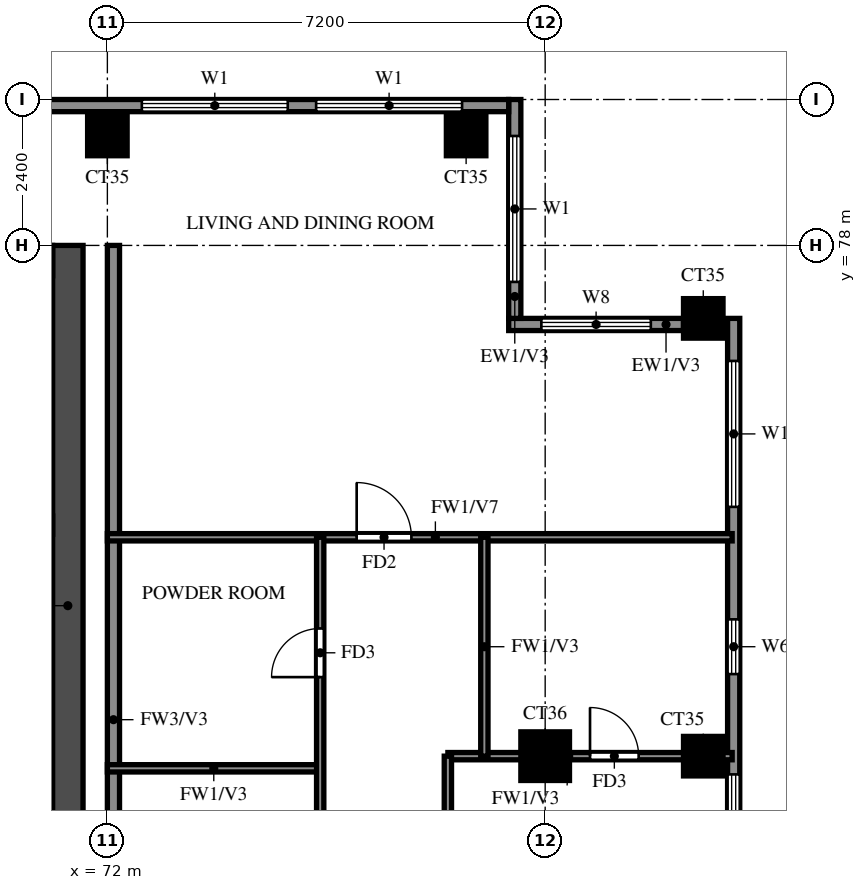
"""IFC4 building model, lengths in metres.
Left out: names, types, materials, properties, quantities, classifications, styles, units other than length and angle.
Written with IfcOpenShell. Run it as: python <this file> out.ifc"""

import sys

from ifc_helpers import new_model, si_unit, direction, frame, frame_2d, origin, origin_2d, place, context, subcontext, project, spatial, rectangle, extrude, source, transform, mapped, element, fill, save


model = new_model("IFC4")
c1 = context("Model", 3, precision=1e-05, world=origin(), true_north=direction((0.0, 1.0)))
c2 = subcontext(c1, "Body", "Model", "MODEL_VIEW")
j1 = project(units=[si_unit("LENGTHUNIT", "METRE"), si_unit("PLANEANGLEUNIT", "RADIAN")], contexts=[c1])
p1 = place(None, origin())
s1 = spatial("IfcSite", under=j1, at=p1, CompositionType="ELEMENT")
p2 = place(p1, origin())
s2 = spatial("IfcBuilding", under=s1, at=p2, CompositionType="ELEMENT")
p3 = place(p2, frame((0.0, 0.0, 246.5)))
s3 = spatial("IfcBuildingStorey", under=s2, at=p3, CompositionType="ELEMENT", Elevation=246.5)
m1 = source(origin(), c2, "Body", "SweptSolid", [
    extrude(rectangle(XDim=0.8, YDim=0.8, at=origin_2d()), origin(), (0.0, 0.0, 1.0), 3.22),
])
p4 = place(p3, frame((79.2, 69.6, 0.0), z_axis=(0.0, 0.0, 1.0), x_axis=(1.0, 0.0, 0.0)))
e1 = element("IfcColumn", 1, at=p4, inside=s3, PredefinedType="COLUMN", context=c2, shape_type="MappedRepresentation", body=[
    mapped(m1, transform((0.0, 0.0, 0.0))),
])
m2 = source(origin(), c2, "Body", "SweptSolid", [
    extrude(rectangle(XDim=0.65, YDim=0.65, at=origin_2d()), origin(), (0.0, 0.0, 1.0), 3.22),
])
for number, where, z_axis, x_axis in (
    (2, (81.8, 69.6, 0.0), (0.0, 0.0, 1.0), (1.0, 0.0, 0.0)),
    (3, (81.8, 76.8, 0.0), (0.0, 0.0, 1.0), (1.0, 0.0, 0.0)),
    (4, (72.0, 79.8, 0.0), (0.0, 0.0, 1.0), (1.0, 0.0, 0.0)),
    (5, (77.9, 79.8, 0.0), (0.0, 0.0, 1.0), (1.0, 0.0, 0.0)),
):
    element("IfcColumn", number, at=place(p3, frame(where, z_axis=z_axis, x_axis=x_axis)), inside=s3, PredefinedType="COLUMN", context=c2, shape_type="MappedRepresentation", body=[
        mapped(m2, transform((0.0, 0.0, 0.0))),
    ])
p5 = place(p3, frame((71.35, 66.15, 0.0), z_axis=(0.0, 0.0, 1.0), x_axis=(0.0, 1.0, 0.0)))
e6 = element("IfcWall", 6, at=p5, inside=s3, PredefinedType="SHEAR", context=c2, shape_type="SweptSolid", body=[
    extrude(rectangle(XDim=11.85, YDim=0.5, at=frame_2d((5.925, 0.0))), origin(), (0.0, 0.0, 1.0), 3.22),
])
p6 = place(p3, frame((29.7, 77.75, 0.0), z_axis=(0.0, 0.0, 1.0), x_axis=(1.0, 0.0, 0.0)))
e7 = element("IfcWall", 7, at=p6, inside=s3, PredefinedType="SHEAR", context=c2, shape_type="SweptSolid", body=[
    extrude(rectangle(XDim=41.4, YDim=0.5, at=frame_2d((20.7, 0.0))), origin(), (0.0, 0.0, 1.0), 3.22),
])
p7 = place(p3, frame((82.3, 48.2, 0.0), z_axis=(0.0, 0.0, 1.0), x_axis=(0.0, 1.0, 0.0)))
e8 = element("IfcWall", 8, at=p7, inside=s3, PredefinedType="SOLIDWALL", context=c2, shape_type="SweptSolid", body=[
    extrude(rectangle(XDim=28.6, YDim=0.2, at=frame_2d((14.3, 0.0))), origin(), (0.0, 0.0, 1.0), 3.22),
])
p8 = place(p7, frame((15.1, 0.0, 0.0)))
e9 = element("IfcOpeningElement", 9, at=p8, cuts=e8, PredefinedType="OPENING", context=c2, shape_type="SweptSolid", body=[
    extrude(rectangle(XDim=1.8, YDim=2.4, at=frame_2d((0.9, 1.2))), frame((0.0, 0.11, 0.0), z_axis=(0.0, -1.0, 0.0), x_axis=(1.0, 0.0, 0.0)), (0.0, 0.0, 1.0), 0.22),
])
p9 = place(p7, frame((0.9, 0.0, 0.6)))
e10 = element("IfcOpeningElement", 10, at=p9, cuts=e8, PredefinedType="OPENING", context=c2, shape_type="SweptSolid", body=[
    extrude(rectangle(XDim=2.4, YDim=2.4, at=frame_2d((1.2, 1.2))), frame((0.0, 0.11, 0.0), z_axis=(0.0, -1.0, 0.0), x_axis=(1.0, 0.0, 0.0)), (0.0, 0.0, 1.0), 0.22),
])
p10 = place(p7, frame((3.9, 0.0, 0.6)))
e11 = element("IfcOpeningElement", 11, at=p10, cuts=e8, PredefinedType="OPENING", context=c2, shape_type="SweptSolid", body=[
    extrude(rectangle(XDim=2.4, YDim=2.4, at=frame_2d((1.2, 1.2))), frame((0.0, 0.11, 0.0), z_axis=(0.0, -1.0, 0.0), x_axis=(1.0, 0.0, 0.0)), (0.0, 0.0, 1.0), 0.22),
])
p11 = place(p7, frame((7.6, 0.0, 0.6)))
e12 = element("IfcOpeningElement", 12, at=p11, cuts=e8, PredefinedType="OPENING", context=c2, shape_type="SweptSolid", body=[
    extrude(rectangle(XDim=2.4, YDim=2.4, at=frame_2d((1.2, 1.2))), frame((0.0, 0.11, 0.0), z_axis=(0.0, -1.0, 0.0), x_axis=(1.0, 0.0, 0.0)), (0.0, 0.0, 1.0), 0.22),
])
p12 = place(p7, frame((10.75, 0.0, 0.6)))
e13 = element("IfcOpeningElement", 13, at=p12, cuts=e8, PredefinedType="OPENING", context=c2, shape_type="SweptSolid", body=[
    extrude(rectangle(XDim=0.9, YDim=2.4, at=frame_2d((0.45, 1.2))), frame((0.0, 0.11, 0.0), z_axis=(0.0, -1.0, 0.0), x_axis=(1.0, 0.0, 0.0)), (0.0, 0.0, 1.0), 0.22),
])
p13 = place(p7, frame((12.7, 0.0, 0.6)))
e14 = element("IfcOpeningElement", 14, at=p13, cuts=e8, PredefinedType="OPENING", context=c2, shape_type="SweptSolid", body=[
    extrude(rectangle(XDim=1.2, YDim=2.4, at=frame_2d((0.6, 1.2))), frame((0.0, 0.11, 0.0), z_axis=(0.0, -1.0, 0.0), x_axis=(1.0, 0.0, 0.0)), (0.0, 0.0, 1.0), 0.22),
])
p14 = place(p7, frame((17.35, 0.0, 0.6)))
e15 = element("IfcOpeningElement", 15, at=p14, cuts=e8, PredefinedType="OPENING", context=c2, shape_type="SweptSolid", body=[
    extrude(rectangle(XDim=0.9, YDim=2.4, at=frame_2d((0.45, 1.2))), frame((0.0, 0.11, 0.0), z_axis=(0.0, -1.0, 0.0), x_axis=(1.0, 0.0, 0.0)), (0.0, 0.0, 1.0), 0.22),
])
p15 = place(p7, frame((19.3, 0.0, 0.6)))
e16 = element("IfcOpeningElement", 16, at=p15, cuts=e8, PredefinedType="OPENING", context=c2, shape_type="SweptSolid", body=[
    extrude(rectangle(XDim=1.8, YDim=2.4, at=frame_2d((0.9, 1.2))), frame((0.0, 0.11, 0.0), z_axis=(0.0, -1.0, 0.0), x_axis=(1.0, 0.0, 0.0)), (0.0, 0.0, 1.0), 0.22),
])
p16 = place(p7, frame((22.75, 0.0, 1.5)))
e17 = element("IfcOpeningElement", 17, at=p16, cuts=e8, PredefinedType="OPENING", context=c2, shape_type="SweptSolid", body=[
    extrude(rectangle(XDim=0.9, YDim=0.9, at=frame_2d((0.45, 0.45))), frame((0.0, 0.11, 0.0), z_axis=(0.0, -1.0, 0.0), x_axis=(1.0, 0.0, 0.0)), (0.0, 0.0, 1.0), 0.22),
])
p17 = place(p7, frame((25.5, 0.0, 0.6)))
e18 = element("IfcOpeningElement", 18, at=p17, cuts=e8, PredefinedType="OPENING", context=c2, shape_type="SweptSolid", body=[
    extrude(rectangle(XDim=2.4, YDim=2.4, at=frame_2d((1.2, 1.2))), frame((0.0, 0.11, 0.0), z_axis=(0.0, -1.0, 0.0), x_axis=(1.0, 0.0, 0.0)), (0.0, 0.0, 1.0), 0.22),
])
p18 = place(p3, frame((81.475, 76.7, 0.0), z_axis=(0.0, 0.0, 1.0), x_axis=(-1.0, 0.0, 0.0)))
e19 = element("IfcWall", 19, at=p18, inside=s3, PredefinedType="SOLIDWALL", context=c2, shape_type="SweptSolid", body=[
    extrude(rectangle(XDim=2.875, YDim=0.2, at=frame_2d((1.438, 0.0))), origin(), (0.0, 0.0, 1.0), 3.22),
])
p19 = place(p18, frame((0.538, 0.0, 0.6)))
e20 = element("IfcOpeningElement", 20, at=p19, cuts=e19, PredefinedType="OPENING", context=c2, shape_type="SweptSolid", body=[
    extrude(rectangle(XDim=1.8, YDim=2.4, at=frame_2d((0.9, 1.2))), frame((0.0, 0.11, 0.0), z_axis=(0.0, -1.0, 0.0), x_axis=(1.0, 0.0, 0.0)), (0.0, 0.0, 1.0), 0.22),
])
p20 = place(p3, frame((78.7, 76.8, 0.0), z_axis=(0.0, 0.0, 1.0), x_axis=(0.0, 1.0, 0.0)))
e21 = element("IfcWall", 21, at=p20, inside=s3, PredefinedType="SOLIDWALL", context=c2, shape_type="SweptSolid", body=[
    extrude(rectangle(XDim=3.6, YDim=0.2, at=frame_2d((1.8, 0.0))), origin(), (0.0, 0.0, 1.0), 3.22),
])
p21 = place(p20, frame((0.6, 0.0, 0.6)))
e22 = element("IfcOpeningElement", 22, at=p21, cuts=e21, PredefinedType="OPENING", context=c2, shape_type="SweptSolid", body=[
    extrude(rectangle(XDim=2.4, YDim=2.4, at=frame_2d((1.2, 1.2))), frame((0.0, 0.11, 0.0), z_axis=(0.0, -1.0, 0.0), x_axis=(1.0, 0.0, 0.0)), (0.0, 0.0, 1.0), 0.22),
])
p22 = place(p3, frame((78.6, 80.3, 0.0), z_axis=(0.0, 0.0, 1.0), x_axis=(-1.0, 0.0, 0.0)))
e23 = element("IfcWall", 23, at=p22, inside=s3, PredefinedType="SOLIDWALL", context=c2, shape_type="SweptSolid", body=[
    extrude(rectangle(XDim=56.6, YDim=0.2, at=frame_2d((28.3, 0.0))), origin(), (0.0, 0.0, 1.0), 3.22),
])
p23 = place(p22, frame((50.433, 0.0, 0.6)))
e24 = element("IfcOpeningElement", 24, at=p23, cuts=e23, PredefinedType="OPENING", context=c2, shape_type="SweptSolid", body=[
    extrude(rectangle(XDim=2.4, YDim=2.4, at=frame_2d((1.2, 1.2))), frame((0.0, 0.11, 0.0), z_axis=(0.0, -1.0, 0.0), x_axis=(1.0, 0.0, 0.0)), (0.0, 0.0, 1.0), 0.22),
])
p24 = place(p22, frame((53.367, 0.0, 0.6)))
e25 = element("IfcOpeningElement", 25, at=p24, cuts=e23, PredefinedType="OPENING", context=c2, shape_type="SweptSolid", body=[
    extrude(rectangle(XDim=2.4, YDim=2.4, at=frame_2d((1.2, 1.2))), frame((0.0, 0.11, 0.0), z_axis=(0.0, -1.0, 0.0), x_axis=(1.0, 0.0, 0.0)), (0.0, 0.0, 1.0), 0.22),
])
p25 = place(p22, frame((0.767, 0.0, 0.6)))
e26 = element("IfcOpeningElement", 26, at=p25, cuts=e23, PredefinedType="OPENING", context=c2, shape_type="SweptSolid", body=[
    extrude(rectangle(XDim=2.4, YDim=2.4, at=frame_2d((1.2, 1.2))), frame((0.0, 0.11, 0.0), z_axis=(0.0, -1.0, 0.0), x_axis=(1.0, 0.0, 0.0)), (0.0, 0.0, 1.0), 0.22),
])
p26 = place(p22, frame((3.633, 0.0, 0.6)))
e27 = element("IfcOpeningElement", 27, at=p26, cuts=e23, PredefinedType="OPENING", context=c2, shape_type="SweptSolid", body=[
    extrude(rectangle(XDim=2.4, YDim=2.4, at=frame_2d((1.2, 1.2))), frame((0.0, 0.11, 0.0), z_axis=(0.0, -1.0, 0.0), x_axis=(1.0, 0.0, 0.0)), (0.0, 0.0, 1.0), 0.22),
])
p27 = place(p3, frame((72.1, 62.4, 0.0), z_axis=(0.0, 0.0, 1.0), x_axis=(0.0, 1.0, 0.0)))
e28 = element("IfcWall", 28, at=p27, inside=s3, PredefinedType="SOLIDWALL", context=c2, shape_type="SweptSolid", body=[
    extrude(rectangle(XDim=15.6, YDim=0.2, at=frame_2d((7.8, 0.0))), origin(), (0.0, 0.0, 1.0), 3.22),
])
p28 = place(p3, frame((72.0, 69.4, 0.0), z_axis=(0.0, 0.0, 1.0), x_axis=(1.0, 0.0, 0.0)))
e29 = element("IfcWall", 29, at=p28, inside=s3, PredefinedType="PARTITIONING", context=c2, shape_type="SweptSolid", body=[
    extrude(rectangle(XDim=3.5, YDim=0.12, at=frame_2d((1.75, 0.0))), origin(), (0.0, 0.0, 1.0), 3.22),
])
p29 = place(p3, frame((77.6, 69.6, 0.0), z_axis=(0.0, 0.0, 1.0), x_axis=(1.0, 0.0, 0.0)))
e30 = element("IfcWall", 30, at=p29, inside=s3, PredefinedType="PARTITIONING", context=c2, shape_type="SweptSolid", body=[
    extrude(rectangle(XDim=4.675, YDim=0.12, at=frame_2d((2.337, 0.0))), origin(), (0.0, 0.0, 1.0), 3.22),
])
p30 = place(p29, frame((2.337, 0.0, 0.0)))
e31 = element("IfcOpeningElement", 31, at=p30, cuts=e30, PredefinedType="OPENING", context=c2, shape_type="SweptSolid", body=[
    extrude(rectangle(XDim=0.8, YDim=2.1, at=frame_2d((0.4, 1.05))), frame((0.0, 0.07, 0.0), z_axis=(0.0, -1.0, 0.0), x_axis=(1.0, 0.0, 0.0)), (0.0, 0.0, 1.0), 0.14),
])
p31 = place(p3, frame((72.0, 73.2, 0.0), z_axis=(0.0, 0.0, 1.0), x_axis=(1.0, 0.0, 0.0)))
e32 = element("IfcWall", 32, at=p31, inside=s3, PredefinedType="PARTITIONING", context=c2, shape_type="SweptSolid", body=[
    extrude(rectangle(XDim=10.275, YDim=0.12, at=frame_2d((5.137, 0.0))), origin(), (0.0, 0.0, 1.0), 2.32),
])
p32 = place(p31, frame((4.1, 0.0, 0.0)))
e33 = element("IfcOpeningElement", 33, at=p32, cuts=e32, PredefinedType="OPENING", context=c2, shape_type="SweptSolid", body=[
    extrude(rectangle(XDim=0.9, YDim=2.1, at=frame_2d((0.45, 1.05))), frame((0.0, 0.07, 0.0), z_axis=(0.0, -1.0, 0.0), x_axis=(1.0, 0.0, 0.0)), (0.0, 0.0, 1.0), 0.14),
])
p33 = place(p3, frame((75.5, 61.2, 0.0), z_axis=(0.0, 0.0, 1.0), x_axis=(0.0, 1.0, 0.0)))
e34 = element("IfcWall", 34, at=p33, inside=s3, PredefinedType="PARTITIONING", context=c2, shape_type="SweptSolid", body=[
    extrude(rectangle(XDim=12.0, YDim=0.12, at=frame_2d((6.0, 0.0))), origin(), (0.0, 0.0, 1.0), 3.22),
])
p34 = place(p33, frame((5.3, 0.0, 0.0)))
e35 = element("IfcOpeningElement", 35, at=p34, cuts=e34, PredefinedType="OPENING", context=c2, shape_type="SweptSolid", body=[
    extrude(rectangle(XDim=0.9, YDim=2.1, at=frame_2d((0.45, 1.05))), frame((0.0, 0.07, 0.0), z_axis=(0.0, -1.0, 0.0), x_axis=(1.0, 0.0, 0.0)), (0.0, 0.0, 1.0), 0.14),
])
p35 = place(p33, frame((9.7, 0.0, 0.0)))
e36 = element("IfcOpeningElement", 36, at=p35, cuts=e34, PredefinedType="OPENING", context=c2, shape_type="SweptSolid", body=[
    extrude(rectangle(XDim=0.8, YDim=2.1, at=frame_2d((0.4, 1.05))), frame((0.0, 0.07, 0.0), z_axis=(0.0, -1.0, 0.0), x_axis=(1.0, 0.0, 0.0)), (0.0, 0.0, 1.0), 0.14),
])
p36 = place(p3, frame((77.6, 48.125, 0.0), z_axis=(0.0, 0.0, 1.0), x_axis=(0.0, 1.0, 0.0)))
e37 = element("IfcWall", 37, at=p36, inside=s3, PredefinedType="PARTITIONING", context=c2, shape_type="SweptSolid", body=[
    extrude(rectangle(XDim=21.475, YDim=0.12, at=frame_2d((10.738, 0.0))), origin(), (0.0, 0.0, 1.0), 3.22),
])
p37 = place(p36, frame((2.788, 0.0, 0.0)))
e38 = element("IfcOpeningElement", 38, at=p37, cuts=e37, PredefinedType="OPENING", context=c2, shape_type="SweptSolid", body=[
    extrude(rectangle(XDim=1.5, YDim=2.1, at=frame_2d((0.75, 1.05))), frame((0.0, 0.07, 0.0), z_axis=(0.0, -1.0, 0.0), x_axis=(1.0, 0.0, 0.0)), (0.0, 0.0, 1.0), 0.14),
])
p38 = place(p36, frame((8.425, 0.0, 0.0)))
e39 = element("IfcOpeningElement", 39, at=p38, cuts=e37, PredefinedType="OPENING", context=c2, shape_type="SweptSolid", body=[
    extrude(rectangle(XDim=0.9, YDim=2.1, at=frame_2d((0.45, 1.05))), frame((0.0, 0.07, 0.0), z_axis=(0.0, -1.0, 0.0), x_axis=(1.0, 0.0, 0.0)), (0.0, 0.0, 1.0), 0.14),
])
p39 = place(p36, frame((12.025, 0.0, 0.0)))
e40 = element("IfcOpeningElement", 40, at=p39, cuts=e37, PredefinedType="OPENING", context=c2, shape_type="SweptSolid", body=[
    extrude(rectangle(XDim=0.9, YDim=2.1, at=frame_2d((0.45, 1.05))), frame((0.0, 0.07, 0.0), z_axis=(0.0, -1.0, 0.0), x_axis=(1.0, 0.0, 0.0)), (0.0, 0.0, 1.0), 0.14),
])
p40 = place(p36, frame((17.425, 0.0, 0.0)))
e41 = element("IfcOpeningElement", 41, at=p40, cuts=e37, PredefinedType="OPENING", context=c2, shape_type="SweptSolid", body=[
    extrude(rectangle(XDim=0.9, YDim=2.1, at=frame_2d((0.45, 1.05))), frame((0.0, 0.07, 0.0), z_axis=(0.0, -1.0, 0.0), x_axis=(1.0, 0.0, 0.0)), (0.0, 0.0, 1.0), 0.14),
])
p41 = place(p3, frame((78.2, 69.6, 0.0), z_axis=(0.0, 0.0, 1.0), x_axis=(0.0, 1.0, 0.0)))
e42 = element("IfcWall", 42, at=p41, inside=s3, PredefinedType="PARTITIONING", context=c2, shape_type="SweptSolid", body=[
    extrude(rectangle(XDim=3.6, YDim=0.12, at=frame_2d((1.8, 0.0))), origin(), (0.0, 0.0, 1.0), 3.22),
])
p42 = place(p15, origin())
e43 = element("IfcWindow", 43, at=p42, inside=s3, PartitioningType="DOUBLE_PANEL_VERTICAL", PredefinedType="WINDOW", context=c2, shape_type="SweptSolid", body=[
    extrude(rectangle(XDim=1.8, YDim=2.4, at=frame_2d((0.9, 1.2))), frame((0.0, 0.03, 0.0), z_axis=(0.0, -1.0, 0.0), x_axis=(1.0, 0.0, 0.0)), (0.0, 0.0, 1.0), 0.06),
])
fill(e16, e43)
p43 = place(p16, origin())
e44 = element("IfcWindow", 44, at=p43, inside=s3, PartitioningType="SINGLE_PANEL", PredefinedType="WINDOW", context=c2, shape_type="SweptSolid", body=[
    extrude(rectangle(XDim=0.9, YDim=0.9, at=frame_2d((0.45, 0.45))), frame((0.0, 0.03, 0.0), z_axis=(0.0, -1.0, 0.0), x_axis=(1.0, 0.0, 0.0)), (0.0, 0.0, 1.0), 0.06),
])
fill(e17, e44)
p44 = place(p17, origin())
e45 = element("IfcWindow", 45, at=p44, inside=s3, PartitioningType="DOUBLE_PANEL_VERTICAL", PredefinedType="WINDOW", context=c2, shape_type="SweptSolid", body=[
    extrude(rectangle(XDim=2.4, YDim=2.4, at=frame_2d((1.2, 1.2))), frame((0.0, 0.03, 0.0), z_axis=(0.0, -1.0, 0.0), x_axis=(1.0, 0.0, 0.0)), (0.0, 0.0, 1.0), 0.06),
])
fill(e18, e45)
p45 = place(p19, origin())
e46 = element("IfcWindow", 46, at=p45, inside=s3, PartitioningType="DOUBLE_PANEL_VERTICAL", PredefinedType="WINDOW", context=c2, shape_type="SweptSolid", body=[
    extrude(rectangle(XDim=1.8, YDim=2.4, at=frame_2d((0.9, 1.2))), frame((0.0, 0.03, 0.0), z_axis=(0.0, -1.0, 0.0), x_axis=(1.0, 0.0, 0.0)), (0.0, 0.0, 1.0), 0.06),
])
fill(e20, e46)
p46 = place(p21, origin())
e47 = element("IfcWindow", 47, at=p46, inside=s3, PartitioningType="DOUBLE_PANEL_VERTICAL", PredefinedType="WINDOW", context=c2, shape_type="SweptSolid", body=[
    extrude(rectangle(XDim=2.4, YDim=2.4, at=frame_2d((1.2, 1.2))), frame((0.0, 0.03, 0.0), z_axis=(0.0, -1.0, 0.0), x_axis=(1.0, 0.0, 0.0)), (0.0, 0.0, 1.0), 0.06),
])
fill(e22, e47)
p47 = place(p25, origin())
e48 = element("IfcWindow", 48, at=p47, inside=s3, PartitioningType="DOUBLE_PANEL_VERTICAL", PredefinedType="WINDOW", context=c2, shape_type="SweptSolid", body=[
    extrude(rectangle(XDim=2.4, YDim=2.4, at=frame_2d((1.2, 1.2))), frame((0.0, 0.03, 0.0), z_axis=(0.0, -1.0, 0.0), x_axis=(1.0, 0.0, 0.0)), (0.0, 0.0, 1.0), 0.06),
])
fill(e26, e48)
p48 = place(p26, origin())
e49 = element("IfcWindow", 49, at=p48, inside=s3, PartitioningType="DOUBLE_PANEL_VERTICAL", PredefinedType="WINDOW", context=c2, shape_type="SweptSolid", body=[
    extrude(rectangle(XDim=2.4, YDim=2.4, at=frame_2d((1.2, 1.2))), frame((0.0, 0.03, 0.0), z_axis=(0.0, -1.0, 0.0), x_axis=(1.0, 0.0, 0.0)), (0.0, 0.0, 1.0), 0.06),
])
fill(e27, e49)
p49 = place(p30, origin())
e50 = element("IfcDoor", 50, at=p49, inside=s3, OperationType="SINGLE_SWING_RIGHT", PredefinedType="DOOR", context=c2, shape_type="SweptSolid", body=[
    extrude(rectangle(XDim=0.8, YDim=2.1, at=frame_2d((0.4, 1.05))), frame((0.0, 0.025, 0.0), z_axis=(0.0, -1.0, 0.0), x_axis=(1.0, 0.0, 0.0)), (0.0, 0.0, 1.0), 0.05),
])
fill(e31, e50)
p50 = place(p32, origin())
e51 = element("IfcDoor", 51, at=p50, inside=s3, OperationType="SINGLE_SWING_LEFT", PredefinedType="DOOR", context=c2, shape_type="SweptSolid", body=[
    extrude(rectangle(XDim=0.9, YDim=2.1, at=frame_2d((0.45, 1.05))), frame((0.0, 0.025, 0.0), z_axis=(0.0, -1.0, 0.0), x_axis=(1.0, 0.0, 0.0)), (0.0, 0.0, 1.0), 0.05),
])
fill(e33, e51)
p51 = place(p35, origin())
e52 = element("IfcDoor", 52, at=p51, inside=s3, OperationType="SINGLE_SWING_LEFT", PredefinedType="DOOR", context=c2, shape_type="SweptSolid", body=[
    extrude(rectangle(XDim=0.8, YDim=2.1, at=frame_2d((0.4, 1.05))), frame((0.0, 0.025, 0.0), z_axis=(0.0, -1.0, 0.0), x_axis=(1.0, 0.0, 0.0)), (0.0, 0.0, 1.0), 0.05),
])
fill(e36, e52)
save(model, sys.argv[1])
